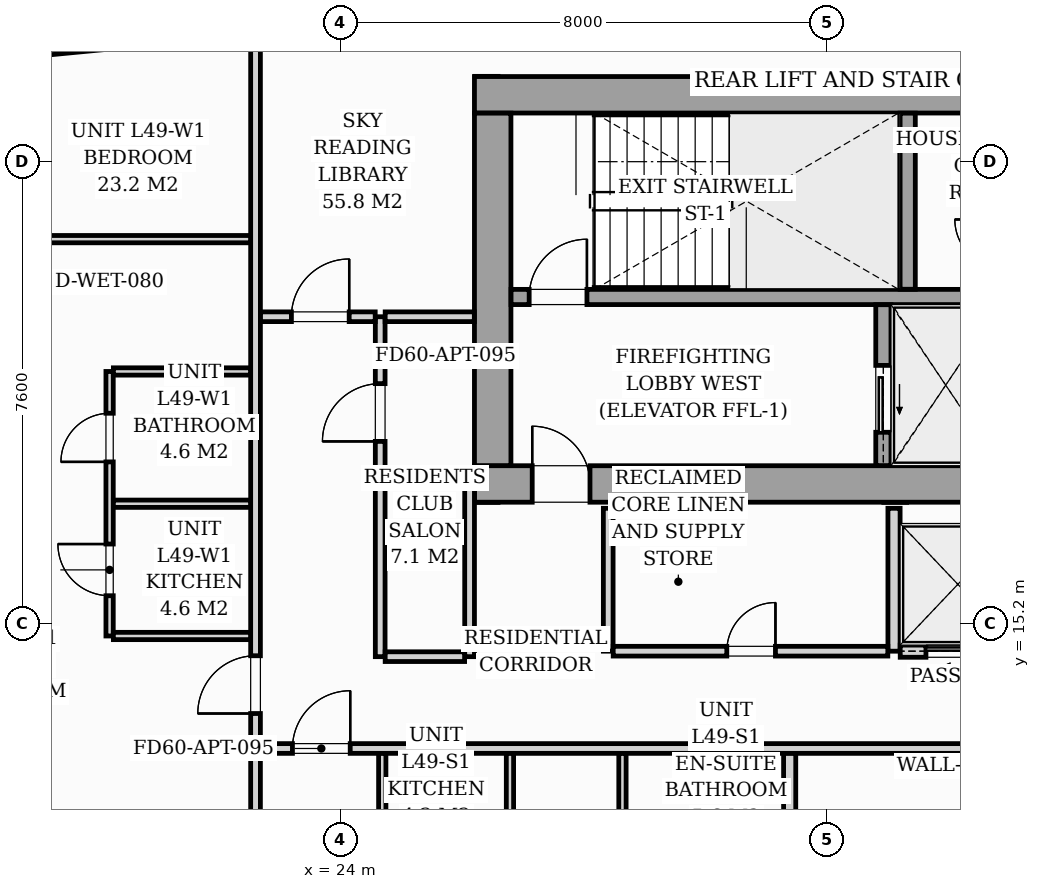
"""IFC4 building model, lengths in metres.
Left out: names, types, materials, properties, quantities, classifications, styles, units other than length and angle.
Written with IfcOpenShell. Run it as: python <this file> out.ifc"""

import sys

from ifc_helpers import new_model, si_unit, direction, frame, frame_2d, origin, origin_2d, place, context, subcontext, project, spatial, rectangle, i_section, extrude, source, transform, mapped, element, fill, save


model = new_model("IFC4")
c1 = context("Model", 3, precision=1e-05, world=origin(), true_north=direction((0.0, 1.0)))
c2 = subcontext(c1, "Body", "Model", "MODEL_VIEW")
j1 = project(units=[si_unit("LENGTHUNIT", "METRE"), si_unit("PLANEANGLEUNIT", "RADIAN")], contexts=[c1])
p1 = place(None, origin())
s1 = spatial("IfcSite", under=j1, at=p1, CompositionType="ELEMENT")
p2 = place(p1, origin())
s2 = spatial("IfcBuilding", under=s1, at=p2, CompositionType="ELEMENT")
p3 = place(p2, frame((0.0, 0.0, 173.0)))
s3 = spatial("IfcBuildingStorey", under=s2, at=p3, CompositionType="ELEMENT", Elevation=173.0)
m1 = source(origin(), c2, "Body", "SweptSolid", [
    extrude(i_section(OverallWidth=0.416, OverallDepth=0.446, WebThickness=0.039, FlangeThickness=0.063, FilletRadius=0.018, at=origin_2d()), origin(), (0.0, 0.0, 1.0), 3.196),
])
for number, where, z_axis, x_axis in (
    (1, (26.4, 17.4, 0.002), (0.0, 0.0, 1.0), (1.0, 0.0, 0.0)),
    (2, (33.12, 17.4, 0.002), (0.0, 0.0, 1.0), (1.0, 0.0, 0.0)),
    (3, (26.4, 24.0, 0.002), (0.0, 0.0, 1.0), (1.0, 0.0, 0.0)),
    (4, (33.12, 24.0, 0.002), (0.0, 0.0, 1.0), (1.0, 0.0, 0.0)),
):
    element("IfcColumn", number, at=place(p3, frame(where, z_axis=z_axis, x_axis=x_axis)), inside=s3, PredefinedType="PILASTER", context=c2, shape_type="MappedRepresentation", body=[
        mapped(m1, transform((0.0, 0.0, 0.0), scale=1.0)),
    ])
p4 = place(p3, frame((15.437, 24.324, 0.0), z_axis=(0.0, 0.0, 1.0), x_axis=(0.995395627913, 0.095851676732, 0.0)))
e5 = element("IfcWall", 5, at=p4, inside=s3, PredefinedType="STANDARD", context=c2, shape_type="SweptSolid", body=[
    extrude(rectangle(XDim=16.1, YDim=0.26, at=frame_2d((8.05, 0.0))), origin(), (0.0, 0.0, 1.0), 2.94),
])
p5 = place(p4, frame((7.492, 0.0, 0.0)))
e6 = element("IfcOpeningElement", 6, at=p5, cuts=e5, PredefinedType="OPENING", context=c2, shape_type="SweptSolid", body=[
    extrude(rectangle(XDim=1.8, YDim=2.06, at=frame_2d((0.9, 1.03))), frame((0.0, 0.14, 0.0), z_axis=(0.0, -1.0, 0.0), x_axis=(1.0, 0.0, 0.0)), (0.0, 0.0, 1.0), 0.28),
])
p6 = place(p4, frame((2.05, 0.0, 0.65)))
e7 = element("IfcOpeningElement", 7, at=p6, cuts=e5, PredefinedType="OPENING", context=c2, shape_type="SweptSolid", body=[
    extrude(rectangle(XDim=1.6, YDim=1.5, at=frame_2d((0.8, 0.75))), frame((0.0, 0.14, 0.0), z_axis=(0.0, -1.0, 0.0), x_axis=(1.0, 0.0, 0.0)), (0.0, 0.0, 1.0), 0.28),
])
p7 = place(p3, frame((26.2, 17.5, 0.0), z_axis=(0.0, 0.0, 1.0), x_axis=(1.0, 0.0, 0.0)))
e8 = element("IfcWall", 8, at=p7, inside=s3, PredefinedType="SHEAR", context=c2, shape_type="SweptSolid", body=[
    extrude(rectangle(XDim=19.6, YDim=0.6, at=frame_2d((9.8, 0.0))), origin(), (0.0, 0.0, 1.0), 3.2),
])
p8 = place(p7, frame((0.95, 0.0, 0.0)))
e9 = element("IfcOpeningElement", 9, at=p8, cuts=e8, PredefinedType="OPENING", context=c2, shape_type="SweptSolid", body=[
    extrude(rectangle(XDim=0.95, YDim=2.06, at=frame_2d((0.475, 1.03))), frame((0.0, 0.31, 0.0), z_axis=(0.0, -1.0, 0.0), x_axis=(1.0, 0.0, 0.0)), (0.0, 0.0, 1.0), 0.62),
])
p9 = place(p7, frame((9.38, 0.0, 0.0)))
e10 = element("IfcOpeningElement", 10, at=p9, cuts=e8, PredefinedType="OPENING", context=c2, shape_type="SweptSolid", body=[
    extrude(rectangle(XDim=0.85, YDim=2.0, at=frame_2d((0.425, 1.0))), frame((0.0, 0.31, 0.0), z_axis=(0.0, -1.0, 0.0), x_axis=(1.0, 0.0, 0.0)), (0.0, 0.0, 1.0), 0.62),
])
p10 = place(p7, frame((17.55, 0.0, 0.0)))
e11 = element("IfcOpeningElement", 11, at=p10, cuts=e8, PredefinedType="OPENING", context=c2, shape_type="SweptSolid", body=[
    extrude(rectangle(XDim=0.95, YDim=2.06, at=frame_2d((0.475, 1.03))), frame((0.0, 0.31, 0.0), z_axis=(0.0, -1.0, 0.0), x_axis=(1.0, 0.0, 0.0)), (0.0, 0.0, 1.0), 0.62),
])
p11 = place(p3, frame((26.2, 23.9, 0.0), z_axis=(0.0, 0.0, 1.0), x_axis=(1.0, 0.0, 0.0)))
e12 = element("IfcWall", 12, at=p11, inside=s3, PredefinedType="SHEAR", context=c2, shape_type="SweptSolid", body=[
    extrude(rectangle(XDim=19.6, YDim=0.6, at=frame_2d((9.8, 0.0))), origin(), (0.0, 0.0, 1.0), 3.2),
])
p12 = place(p3, frame((26.5, 17.802, 0.0), z_axis=(0.0, 0.0, 1.0), x_axis=(0.0, 1.0, 0.0)))
e13 = element("IfcWall", 13, at=p12, inside=s3, PredefinedType="SHEAR", context=c2, shape_type="SweptSolid", body=[
    extrude(rectangle(XDim=5.796, YDim=0.6, at=frame_2d((2.898, 0.0))), origin(), (0.0, 0.0, 1.0), 3.2),
])
p13 = place(p3, frame((26.802, 20.575, 0.0), z_axis=(0.0, 0.0, 1.0), x_axis=(1.0, 0.0, 0.0)))
e14 = element("IfcWall", 14, at=p13, inside=s3, PredefinedType="SOLIDWALL", context=c2, shape_type="SweptSolid", body=[
    extrude(rectangle(XDim=8.148, YDim=0.25, at=frame_2d((4.074, 0.0))), origin(), (0.0, 0.0, 1.0), 3.2),
])
p14 = place(p13, frame((0.298, 0.0, 0.0)))
e15 = element("IfcOpeningElement", 15, at=p14, cuts=e14, PredefinedType="OPENING", context=c2, shape_type="SweptSolid", body=[
    extrude(rectangle(XDim=0.95, YDim=2.06, at=frame_2d((0.475, 1.03))), frame((0.0, 0.135, 0.0), z_axis=(0.0, -1.0, 0.0), x_axis=(1.0, 0.0, 0.0)), (0.0, 0.0, 1.0), 0.27),
])
p15 = place(p3, frame((33.325, 20.702, 0.0), z_axis=(0.0, 0.0, 1.0), x_axis=(0.0, 1.0, 0.0)))
e16 = element("IfcWall", 16, at=p15, inside=s3, PredefinedType="SOLIDWALL", context=c2, shape_type="SweptSolid", body=[
    extrude(rectangle(XDim=2.896, YDim=0.25, at=frame_2d((1.448, 0.0))), origin(), (0.0, 0.0, 1.0), 3.2),
])
p16 = place(p3, frame((32.925, 17.802, 0.0), z_axis=(0.0, 0.0, 1.0), x_axis=(0.0, 1.0, 0.0)))
e17 = element("IfcWall", 17, at=p16, inside=s3, PredefinedType="SOLIDWALL", context=c2, shape_type="SweptSolid", body=[
    extrude(rectangle(XDim=2.646, YDim=0.25, at=frame_2d((1.323, 0.0))), origin(), (0.0, 0.0, 1.0), 3.2),
])
p17 = place(p16, frame((0.548, 0.0, 0.0)))
e18 = element("IfcOpeningElement", 18, at=p17, cuts=e17, PredefinedType="OPENING", context=c2, shape_type="SweptSolid", body=[
    extrude(rectangle(XDim=1.1, YDim=2.08, at=frame_2d((0.55, 1.04))), frame((0.0, 0.135, 0.0), z_axis=(0.0, -1.0, 0.0), x_axis=(1.0, 0.0, 0.0)), (0.0, 0.0, 1.0), 0.27),
])
p18 = place(p3, frame((28.4, 14.75, 0.0), z_axis=(0.0, 0.0, 1.0), x_axis=(0.0, 1.0, 0.0)))
e19 = element("IfcWall", 19, at=p18, inside=s3, PredefinedType="PARTITIONING", context=c2, shape_type="SweptSolid", body=[
    extrude(rectangle(XDim=2.35, YDim=0.16, at=frame_2d((1.175, 0.0))), origin(), (0.0, 0.0, 1.0), 2.94),
])
p19 = place(p3, frame((33.1, 14.75, 0.0), z_axis=(0.0, 0.0, 1.0), x_axis=(0.0, 1.0, 0.0)))
e20 = element("IfcWall", 20, at=p19, inside=s3, PredefinedType="PARTITIONING", context=c2, shape_type="SweptSolid", body=[
    extrude(rectangle(XDim=2.35, YDim=0.2, at=frame_2d((1.175, 0.0))), origin(), (0.0, 0.0, 1.0), 2.94),
])
p20 = place(p3, frame((28.482, 14.75, 0.0), z_axis=(0.0, 0.0, 1.0), x_axis=(1.0, 0.0, 0.0)))
e21 = element("IfcWall", 21, at=p20, inside=s3, PredefinedType="PARTITIONING", context=c2, shape_type="SweptSolid", body=[
    extrude(rectangle(XDim=4.516, YDim=0.16, at=frame_2d((2.258, 0.0))), origin(), (0.0, 0.0, 1.0), 2.94),
])
p21 = place(p20, frame((1.868, 0.0, 0.0)))
e22 = element("IfcOpeningElement", 22, at=p21, cuts=e21, PredefinedType="OPENING", context=c2, shape_type="SweptSolid", body=[
    extrude(rectangle(XDim=0.8, YDim=2.05, at=frame_2d((0.4, 1.025))), frame((0.0, 0.09, 0.0), z_axis=(0.0, -1.0, 0.0), x_axis=(1.0, 0.0, 0.0)), (0.0, 0.0, 1.0), 0.18),
])
p22 = place(p3, frame((33.202, 14.75, 0.0), z_axis=(0.0, 0.0, 1.0), x_axis=(1.0, 0.0, 0.0)))
e23 = element("IfcWall", 23, at=p22, inside=s3, PredefinedType="PARTITIONING", context=c2, shape_type="SweptSolid", body=[
    extrude(rectangle(XDim=1.896, YDim=0.2, at=frame_2d((0.948, 0.0))), origin(), (0.0, 0.0, 1.0), 2.94),
])
p23 = place(p22, frame((0.423, 0.0, 0.0)))
e24 = element("IfcOpeningElement", 24, at=p23, cuts=e23, PredefinedType="OPENING", context=c2, shape_type="SweptSolid", body=[
    extrude(rectangle(XDim=1.05, YDim=2.08, at=frame_2d((0.525, 1.04))), frame((0.0, 0.11, 0.0), z_axis=(0.0, -1.0, 0.0), x_axis=(1.0, 0.0, 0.0)), (0.0, 0.0, 1.0), 0.22),
])
p24 = place(p3, frame((22.6, 13.15, 0.0), z_axis=(0.0, 0.0, 1.0), x_axis=(1.0, 0.0, 0.0)))
e25 = element("IfcWall", 25, at=p24, inside=s3, PredefinedType="PARTITIONING", context=c2, shape_type="SweptSolid", body=[
    extrude(rectangle(XDim=23.28, YDim=0.16, at=frame_2d((11.64, 0.0))), origin(), (0.0, 0.0, 1.0), 2.94),
])
p25 = place(p24, frame((0.607, 0.0, 0.0)))
e26 = element("IfcOpeningElement", 26, at=p25, cuts=e25, PredefinedType="OPENING", context=c2, shape_type="SweptSolid", body=[
    extrude(rectangle(XDim=0.95, YDim=2.06, at=frame_2d((0.475, 1.03))), frame((0.0, 0.09, 0.0), z_axis=(0.0, -1.0, 0.0), x_axis=(1.0, 0.0, 0.0)), (0.0, 0.0, 1.0), 0.18),
])
p26 = place(p24, frame((11.717, 0.0, 0.0)))
e27 = element("IfcOpeningElement", 27, at=p26, cuts=e25, PredefinedType="OPENING", context=c2, shape_type="SweptSolid", body=[
    extrude(rectangle(XDim=0.95, YDim=2.06, at=frame_2d((0.475, 1.03))), frame((0.0, 0.09, 0.0), z_axis=(0.0, -1.0, 0.0), x_axis=(1.0, 0.0, 0.0)), (0.0, 0.0, 1.0), 0.18),
])
p27 = place(p3, frame((22.6, 6.922, 0.0), z_axis=(0.0, 0.0, 1.0), x_axis=(0.0, 1.0, 0.0)))
e28 = element("IfcWall", 28, at=p27, inside=s3, PredefinedType="PARTITIONING", context=c2, shape_type="SweptSolid", body=[
    extrude(rectangle(XDim=6.146, YDim=0.16, at=frame_2d((3.073, 0.0))), origin(), (0.0, 0.0, 1.0), 2.94),
])
p28 = place(p3, frame((22.6, 13.232, 0.0), z_axis=(0.0, 0.0, 1.0), x_axis=(0.0, 1.0, 0.0)))
e29 = element("IfcWall", 29, at=p28, inside=s3, PredefinedType="PARTITIONING", context=c2, shape_type="SweptSolid", body=[
    extrude(rectangle(XDim=11.649, YDim=0.16, at=frame_2d((5.824, 0.0))), origin(), (0.0, 0.0, 1.0), 2.94),
])
p29 = place(p28, frame((0.493, 0.0, 0.0)))
e30 = element("IfcOpeningElement", 30, at=p29, cuts=e29, PredefinedType="OPENING", context=c2, shape_type="SweptSolid", body=[
    extrude(rectangle(XDim=0.95, YDim=2.06, at=frame_2d((0.475, 1.03))), frame((0.0, 0.09, 0.0), z_axis=(0.0, -1.0, 0.0), x_axis=(1.0, 0.0, 0.0)), (0.0, 0.0, 1.0), 0.18),
])
p30 = place(p3, frame((28.634, 7.503, 0.0), z_axis=(0.0, 0.0, 1.0), x_axis=(0.0, 1.0, 0.0)))
e31 = element("IfcWall", 31, at=p30, inside=s3, PredefinedType="PARTITIONING", context=c2, shape_type="SweptSolid", body=[
    extrude(rectangle(XDim=5.565, YDim=0.12, at=frame_2d((2.782, 0.0))), origin(), (0.0, 0.0, 1.0), 2.94),
])
p31 = place(p30, frame((2.297, 0.0, 0.0)))
e32 = element("IfcOpeningElement", 32, at=p31, cuts=e31, PredefinedType="OPENING", context=c2, shape_type="SweptSolid", body=[
    extrude(rectangle(XDim=0.9, YDim=2.05, at=frame_2d((0.45, 1.025))), frame((0.0, 0.07, 0.0), z_axis=(0.0, -1.0, 0.0), x_axis=(1.0, 0.0, 0.0)), (0.0, 0.0, 1.0), 0.14),
])
for number, where, z_axis, x_axis in (
    (33, (26.784, 10.962, 0.0), (0.0, 0.0, 1.0), (0.0, 1.0, 0.0)),
    (34, (24.684, 10.962, 0.0), (0.0, 0.0, 1.0), (0.0, 1.0, 0.0)),
):
    element("IfcWall", number, at=place(p3, frame(where, z_axis=z_axis, x_axis=x_axis)), inside=s3, PredefinedType="PARTITIONING", context=c2, shape_type="SweptSolid", body=[
        extrude(rectangle(XDim=2.106, YDim=0.12, at=frame_2d((1.053, 0.0))), origin(), (0.0, 0.0, 1.0), 2.94),
    ])
p32 = place(p3, frame((31.384, 10.912, 0.0), z_axis=(0.0, 0.0, 1.0), x_axis=(0.0, 1.0, 0.0)))
e35 = element("IfcWall", 35, at=p32, inside=s3, PredefinedType="PARTITIONING", context=c2, shape_type="SweptSolid", body=[
    extrude(rectangle(XDim=2.156, YDim=0.2, at=frame_2d((1.078, 0.0))), origin(), (0.0, 0.0, 1.0), 2.94),
])
p33 = place(p3, frame((20.2, 15.0, 0.0), z_axis=(0.0, 0.0, 1.0), x_axis=(0.0, 1.0, 0.0)))
e36 = element("IfcWall", 36, at=p33, inside=s3, PredefinedType="PARTITIONING", context=c2, shape_type="SweptSolid", body=[
    extrude(rectangle(XDim=4.35, YDim=0.12, at=frame_2d((2.175, 0.0))), origin(), (0.0, 0.0, 1.0), 2.94),
])
p34 = place(p33, frame((0.662, 0.0, 0.0)))
e37 = element("IfcOpeningElement", 37, at=p34, cuts=e36, PredefinedType="OPENING", context=c2, shape_type="SweptSolid", body=[
    extrude(rectangle(XDim=0.85, YDim=2.05, at=frame_2d((0.425, 1.025))), frame((0.0, 0.07, 0.0), z_axis=(0.0, -1.0, 0.0), x_axis=(1.0, 0.0, 0.0)), (0.0, 0.0, 1.0), 0.14),
])
p35 = place(p33, frame((2.863, 0.0, 0.0)))
e38 = element("IfcOpeningElement", 38, at=p35, cuts=e36, PredefinedType="OPENING", context=c2, shape_type="SweptSolid", body=[
    extrude(rectangle(XDim=0.8, YDim=2.02, at=frame_2d((0.4, 1.01))), frame((0.0, 0.07, 0.0), z_axis=(0.0, -1.0, 0.0), x_axis=(1.0, 0.0, 0.0)), (0.0, 0.0, 1.0), 0.14),
])
for number, where, z_axis, x_axis in (
    (39, (20.262, 17.175, 0.0), (0.0, 0.0, 1.0), (1.0, 0.0, 0.0)),
    (40, (20.262, 15.0, 0.0), (0.0, 0.0, 1.0), (1.0, 0.0, 0.0)),
    (41, (20.262, 19.35, 0.0), (0.0, 0.0, 1.0), (1.0, 0.0, 0.0)),
):
    element("IfcWall", number, at=place(p3, frame(where, z_axis=z_axis, x_axis=x_axis)), inside=s3, PredefinedType="PARTITIONING", context=c2, shape_type="SweptSolid", body=[
        extrude(rectangle(XDim=2.256, YDim=0.12, at=frame_2d((1.128, 0.0))), origin(), (0.0, 0.0, 1.0), 2.94),
    ])
p36 = place(p3, frame((14.53, 21.526, 0.0), z_axis=(0.0, 0.0, 1.0), x_axis=(1.0, 0.0, 0.0)))
e42 = element("IfcWall", 42, at=p36, inside=s3, PredefinedType="PARTITIONING", context=c2, shape_type="SweptSolid", body=[
    extrude(rectangle(XDim=7.988, YDim=0.12, at=frame_2d((3.994, 0.0))), origin(), (0.0, 0.0, 1.0), 2.94),
])
p37 = place(p36, frame((2.925, 0.0, 0.0)))
e43 = element("IfcOpeningElement", 43, at=p37, cuts=e42, PredefinedType="OPENING", context=c2, shape_type="SweptSolid", body=[
    extrude(rectangle(XDim=0.85, YDim=2.05, at=frame_2d((0.425, 1.025))), frame((0.0, 0.07, 0.0), z_axis=(0.0, -1.0, 0.0), x_axis=(1.0, 0.0, 0.0)), (0.0, 0.0, 1.0), 0.14),
])
p38 = place(p3, frame((24.65, 14.66, 0.0), z_axis=(0.0, 0.0, 1.0), x_axis=(0.0, 1.0, 0.0)))
e44 = element("IfcWall", 44, at=p38, inside=s3, PredefinedType="PARTITIONING", context=c2, shape_type="SweptSolid", body=[
    extrude(rectangle(XDim=5.59, YDim=0.16, at=frame_2d((2.795, 0.0))), origin(), (0.0, 0.0, 1.0), 2.94),
])
p39 = place(p38, frame((3.54, 0.0, 0.0)))
e45 = element("IfcOpeningElement", 45, at=p39, cuts=e44, PredefinedType="OPENING", context=c2, shape_type="SweptSolid", body=[
    extrude(rectangle(XDim=0.95, YDim=2.06, at=frame_2d((0.475, 1.03))), frame((0.0, 0.09, 0.0), z_axis=(0.0, -1.0, 0.0), x_axis=(1.0, 0.0, 0.0)), (0.0, 0.0, 1.0), 0.18),
])
p40 = place(p3, frame((22.682, 20.25, 0.0), z_axis=(0.0, 0.0, 1.0), x_axis=(1.0, 0.0, 0.0)))
e46 = element("IfcWall", 46, at=p40, inside=s3, PredefinedType="PARTITIONING", context=c2, shape_type="SweptSolid", body=[
    extrude(rectangle(XDim=1.886, YDim=0.16, at=frame_2d((0.943, 0.0))), origin(), (0.0, 0.0, 1.0), 2.94),
])
p41 = place(p40, frame((0.508, 0.0, 0.0)))
e47 = element("IfcOpeningElement", 47, at=p41, cuts=e46, PredefinedType="OPENING", context=c2, shape_type="SweptSolid", body=[
    extrude(rectangle(XDim=0.95, YDim=2.06, at=frame_2d((0.475, 1.03))), frame((0.0, 0.09, 0.0), z_axis=(0.0, -1.0, 0.0), x_axis=(1.0, 0.0, 0.0)), (0.0, 0.0, 1.0), 0.18),
])
p42 = place(p3, frame((24.732, 20.25, 0.0), z_axis=(0.0, 0.0, 1.0), x_axis=(1.0, 0.0, 0.0)))
e48 = element("IfcWall", 48, at=p42, inside=s3, PredefinedType="PARTITIONING", context=c2, shape_type="SweptSolid", body=[
    extrude(rectangle(XDim=1.466, YDim=0.16, at=frame_2d((0.733, 0.0))), origin(), (0.0, 0.0, 1.0), 2.94),
])
p43 = place(p3, frame((26.12, 14.66, 0.0), z_axis=(0.0, 0.0, 1.0), x_axis=(0.0, 1.0, 0.0)))
e49 = element("IfcWall", 49, at=p43, inside=s3, PredefinedType="PARTITIONING", context=c2, shape_type="SweptSolid", body=[
    extrude(rectangle(XDim=2.79, YDim=0.16, at=frame_2d((1.395, 0.0))), origin(), (0.0, 0.0, 1.0), 2.94),
])
p44 = place(p3, frame((24.732, 14.66, 0.0), z_axis=(0.0, 0.0, 1.0), x_axis=(1.0, 0.0, 0.0)))
e50 = element("IfcWall", 50, at=p44, inside=s3, PredefinedType="PARTITIONING", context=c2, shape_type="SweptSolid", body=[
    extrude(rectangle(XDim=1.306, YDim=0.16, at=frame_2d((0.653, 0.0))), origin(), (0.0, 0.0, 1.0), 2.94),
])
m2 = source(origin(), c2, "Body", "SweptSolid", [
    extrude(rectangle(XDim=0.95, YDim=2.06, at=frame_2d((0.475, 1.03))), frame((0.0, 0.025, 0.0), z_axis=(0.0, -1.0, 0.0), x_axis=(1.0, 0.0, 0.0)), (0.0, 0.0, 1.0), 0.05),
])
p45 = place(p8, origin())
e51 = element("IfcDoor", 51, at=p45, inside=s3, OperationType="SINGLE_SWING_LEFT", PredefinedType="DOOR", context=c2, shape_type="MappedRepresentation", body=[
    mapped(m2, transform((0.0, 0.0, 0.0), scale=1.0)),
])
fill(e9, e51)
p46 = place(p14, origin())
e52 = element("IfcDoor", 52, at=p46, inside=s3, OperationType="SINGLE_SWING_RIGHT", PredefinedType="DOOR", context=c2, shape_type="MappedRepresentation", body=[
    mapped(m2, transform((0.0, 0.0, 0.0), scale=1.0)),
])
fill(e15, e52)
m3 = source(origin(), c2, "Body", "SweptSolid", [
    extrude(rectangle(XDim=1.1, YDim=2.08, at=frame_2d((0.55, 1.04))), frame((0.0, 0.025, 0.0), z_axis=(0.0, -1.0, 0.0), x_axis=(1.0, 0.0, 0.0)), (0.0, 0.0, 1.0), 0.05),
])
p47 = place(p17, origin())
e53 = element("IfcDoor", 53, at=p47, inside=s3, OperationType="SLIDING_TO_LEFT", PredefinedType="DOOR", context=c2, shape_type="MappedRepresentation", body=[
    mapped(m3, transform((0.0, 0.0, 0.0), scale=1.0)),
])
fill(e18, e53)
m4 = source(origin(), c2, "Body", "SweptSolid", [
    extrude(rectangle(XDim=0.8, YDim=2.05, at=frame_2d((0.4, 1.025))), frame((0.0, 0.025, 0.0), z_axis=(0.0, -1.0, 0.0), x_axis=(1.0, 0.0, 0.0)), (0.0, 0.0, 1.0), 0.05),
])
p48 = place(p21, origin())
e54 = element("IfcDoor", 54, at=p48, inside=s3, OperationType="SINGLE_SWING_RIGHT", PredefinedType="DOOR", context=c2, shape_type="MappedRepresentation", body=[
    mapped(m4, transform((0.0, 0.0, 0.0), scale=1.0)),
])
fill(e22, e54)
m5 = source(origin(), c2, "Body", "SweptSolid", [
    extrude(rectangle(XDim=1.05, YDim=2.08, at=frame_2d((0.525, 1.04))), frame((0.0, 0.025, 0.0), z_axis=(0.0, -1.0, 0.0), x_axis=(1.0, 0.0, 0.0)), (0.0, 0.0, 1.0), 0.05),
])
p49 = place(p23, origin())
e55 = element("IfcDoor", 55, at=p49, inside=s3, OperationType="SLIDING_TO_LEFT", PredefinedType="DOOR", context=c2, shape_type="MappedRepresentation", body=[
    mapped(m5, transform((0.0, 0.0, 0.0), scale=1.0)),
])
fill(e24, e55)
m6 = source(origin(), c2, "Body", "SweptSolid", [
    extrude(rectangle(XDim=0.95, YDim=2.06, at=frame_2d((0.475, 1.03))), frame((0.0, 0.025, 0.0), z_axis=(0.0, -1.0, 0.0), x_axis=(1.0, 0.0, 0.0)), (0.0, 0.0, 1.0), 0.05),
])
p50 = place(p25, origin())
e56 = element("IfcDoor", 56, at=p50, inside=s3, OperationType="SINGLE_SWING_RIGHT", PredefinedType="DOOR", context=c2, shape_type="MappedRepresentation", body=[
    mapped(m6, transform((0.0, 0.0, 0.0), scale=1.0)),
])
fill(e26, e56)
p51 = place(p29, origin())
e57 = element("IfcDoor", 57, at=p51, inside=s3, OperationType="SINGLE_SWING_LEFT", PredefinedType="DOOR", context=c2, shape_type="MappedRepresentation", body=[
    mapped(m6, transform((0.0, 0.0, 0.0), scale=1.0)),
])
fill(e30, e57)
m7 = source(origin(), c2, "Body", "SweptSolid", [
    extrude(rectangle(XDim=0.85, YDim=2.05, at=frame_2d((0.425, 1.025))), frame((0.0, 0.025, 0.0), z_axis=(0.0, -1.0, 0.0), x_axis=(1.0, 0.0, 0.0)), (0.0, 0.0, 1.0), 0.05),
])
p52 = place(p34, origin())
e58 = element("IfcDoor", 58, at=p52, inside=s3, OperationType="SINGLE_SWING_RIGHT", PredefinedType="DOOR", context=c2, shape_type="MappedRepresentation", body=[
    mapped(m7, transform((0.0, 0.0, 0.0), scale=1.0)),
])
fill(e37, e58)
m8 = source(origin(), c2, "Body", "SweptSolid", [
    extrude(rectangle(XDim=0.8, YDim=2.02, at=frame_2d((0.4, 1.01))), frame((0.0, 0.025, 0.0), z_axis=(0.0, -1.0, 0.0), x_axis=(1.0, 0.0, 0.0)), (0.0, 0.0, 1.0), 0.05),
])
p53 = place(p35, origin())
e59 = element("IfcDoor", 59, at=p53, inside=s3, OperationType="SINGLE_SWING_LEFT", PredefinedType="DOOR", context=c2, shape_type="MappedRepresentation", body=[
    mapped(m8, transform((0.0, 0.0, 0.0), scale=1.0)),
])
fill(e38, e59)
p54 = place(p39, origin())
e60 = element("IfcDoor", 60, at=p54, inside=s3, OperationType="SINGLE_SWING_LEFT", PredefinedType="DOOR", context=c2, shape_type="MappedRepresentation", body=[
    mapped(m6, transform((0.0, 0.0, 0.0), scale=1.0)),
])
fill(e45, e60)
p55 = place(p41, origin())
e61 = element("IfcDoor", 61, at=p55, inside=s3, OperationType="SINGLE_SWING_RIGHT", PredefinedType="DOOR", context=c2, shape_type="MappedRepresentation", body=[
    mapped(m6, transform((0.0, 0.0, 0.0), scale=1.0)),
])
fill(e47, e61)
save(model, sys.argv[1])
